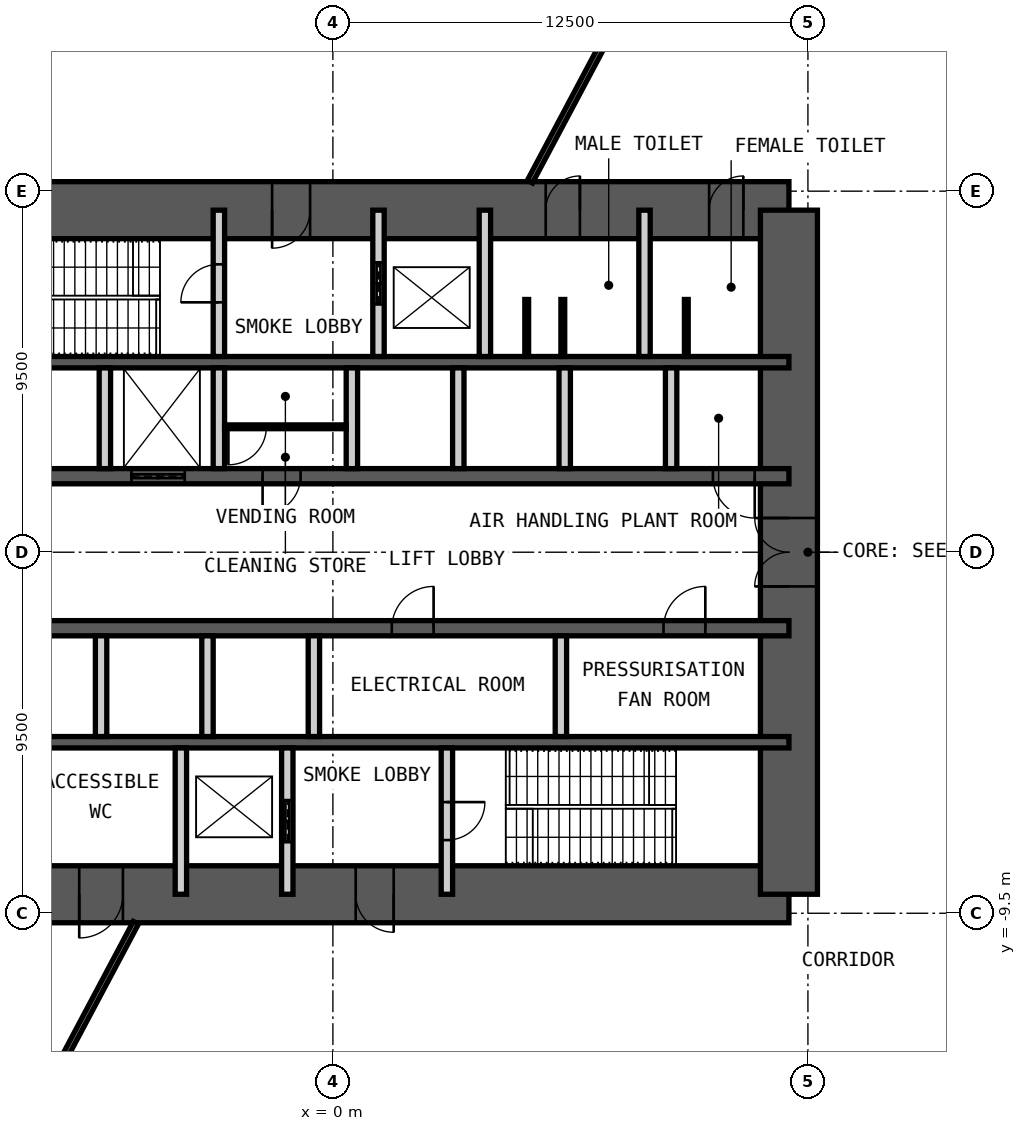
"""IFC4 building model, lengths in metres.
Left out: names, types, materials, properties, quantities, classifications, styles, units other than length and angle.
Written with IfcOpenShell. Run it as: python <this file> out.ifc"""

import sys

from ifc_helpers import new_model, si_unit, direction, frame, frame_2d, origin, place, context, subcontext, project, spatial, rectangle, extrude, element, fill, save


model = new_model("IFC4")
c1 = context("Model", 3, precision=1e-05, world=origin(), true_north=direction((0.0, 1.0)))
c2 = subcontext(c1, "Body", "Model", "MODEL_VIEW")
j1 = project(units=[si_unit("LENGTHUNIT", "METRE"), si_unit("PLANEANGLEUNIT", "RADIAN")], contexts=[c1])
p1 = place(None, origin())
s1 = spatial("IfcSite", under=j1, at=p1, CompositionType="ELEMENT")
p2 = place(p1, origin())
s2 = spatial("IfcBuilding", under=s1, at=p2, CompositionType="ELEMENT")
p3 = place(p2, frame((0.0, 0.0, -6.0)))
s3 = spatial("IfcBuildingStorey", under=s2, at=p3, CompositionType="ELEMENT", Elevation=-6.0)
p4 = place(p3, frame((-12.0, 9.0, 0.0), z_axis=(0.0, 0.0, 1.0), x_axis=(1.0, 0.0, 0.0)))
e1 = element("IfcWall", 1, at=p4, inside=s3, PredefinedType="SHEAR", context=c2, shape_type="SweptSolid", body=[
    extrude(rectangle(XDim=24.0, YDim=1.5, at=frame_2d((12.0, 0.0))), origin(), (0.0, 0.0, 1.0), 6.0),
])
p5 = place(p4, frame((10.4, 0.0, 0.0)))
e2 = element("IfcOpeningElement", 2, at=p5, cuts=e1, PredefinedType="OPENING", context=c2, shape_type="SweptSolid", body=[
    extrude(rectangle(XDim=1.0, YDim=2.1, at=frame_2d((0.5, 1.05))), frame((0.0, 0.76, 0.0), z_axis=(0.0, -1.0, 0.0), x_axis=(1.0, 0.0, 0.0)), (0.0, 0.0, 1.0), 1.52),
])
p6 = place(p4, frame((17.6, 0.0, 0.0)))
e3 = element("IfcOpeningElement", 3, at=p6, cuts=e1, PredefinedType="OPENING", context=c2, shape_type="SweptSolid", body=[
    extrude(rectangle(XDim=0.9, YDim=2.1, at=frame_2d((0.45, 1.05))), frame((0.0, 0.76, 0.0), z_axis=(0.0, -1.0, 0.0), x_axis=(1.0, 0.0, 0.0)), (0.0, 0.0, 1.0), 1.52),
])
p7 = place(p4, frame((21.9, 0.0, 0.0)))
e4 = element("IfcOpeningElement", 4, at=p7, cuts=e1, PredefinedType="OPENING", context=c2, shape_type="SweptSolid", body=[
    extrude(rectangle(XDim=0.9, YDim=2.1, at=frame_2d((0.45, 1.05))), frame((0.0, 0.76, 0.0), z_axis=(0.0, -1.0, 0.0), x_axis=(1.0, 0.0, 0.0)), (0.0, 0.0, 1.0), 1.52),
])
p8 = place(p3, frame((-12.0, -9.0, 0.0), z_axis=(0.0, 0.0, 1.0), x_axis=(1.0, 0.0, 0.0)))
e5 = element("IfcWall", 5, at=p8, inside=s3, PredefinedType="SHEAR", context=c2, shape_type="SweptSolid", body=[
    extrude(rectangle(XDim=24.0, YDim=1.5, at=frame_2d((12.0, 0.0))), origin(), (0.0, 0.0, 1.0), 6.0),
])
p9 = place(p8, frame((1.35, 0.0, 0.0)))
e6 = element("IfcOpeningElement", 6, at=p9, cuts=e5, PredefinedType="OPENING", context=c2, shape_type="SweptSolid", body=[
    extrude(rectangle(XDim=1.0, YDim=2.1, at=frame_2d((0.5, 1.05))), frame((0.0, 0.76, 0.0), z_axis=(0.0, -1.0, 0.0), x_axis=(1.0, 0.0, 0.0)), (0.0, 0.0, 1.0), 1.52),
])
p10 = place(p8, frame((5.325, 0.0, 0.0)))
e7 = element("IfcOpeningElement", 7, at=p10, cuts=e5, PredefinedType="OPENING", context=c2, shape_type="SweptSolid", body=[
    extrude(rectangle(XDim=1.15, YDim=2.1, at=frame_2d((0.575, 1.05))), frame((0.0, 0.76, 0.0), z_axis=(0.0, -1.0, 0.0), x_axis=(1.0, 0.0, 0.0)), (0.0, 0.0, 1.0), 1.52),
])
p11 = place(p8, frame((12.6, 0.0, 0.0)))
e8 = element("IfcOpeningElement", 8, at=p11, cuts=e5, PredefinedType="OPENING", context=c2, shape_type="SweptSolid", body=[
    extrude(rectangle(XDim=1.0, YDim=2.1, at=frame_2d((0.5, 1.05))), frame((0.0, 0.76, 0.0), z_axis=(0.0, -1.0, 0.0), x_axis=(1.0, 0.0, 0.0)), (0.0, 0.0, 1.0), 1.52),
])
p12 = place(p3, frame((12.0, -9.0, 0.0), z_axis=(0.0, 0.0, 1.0), x_axis=(0.0, 1.0, 0.0)))
e9 = element("IfcWall", 9, at=p12, inside=s3, PredefinedType="SHEAR", context=c2, shape_type="SweptSolid", body=[
    extrude(rectangle(XDim=18.0, YDim=1.5, at=frame_2d((9.0, 0.0))), origin(), (0.0, 0.0, 1.0), 6.0),
])
p13 = place(p12, frame((8.1, 0.0, 0.0)))
e10 = element("IfcOpeningElement", 10, at=p13, cuts=e9, PredefinedType="OPENING", context=c2, shape_type="SweptSolid", body=[
    extrude(rectangle(XDim=1.8, YDim=2.1, at=frame_2d((0.9, 1.05))), frame((0.0, 0.76, 0.0), z_axis=(0.0, -1.0, 0.0), x_axis=(1.0, 0.0, 0.0)), (0.0, 0.0, 1.0), 1.52),
])
p14 = place(p3, frame((-12.0, 5.0, 0.0), z_axis=(0.0, 0.0, 1.0), x_axis=(1.0, 0.0, 0.0)))
e11 = element("IfcWall", 11, at=p14, inside=s3, PredefinedType="SHEAR", context=c2, shape_type="SweptSolid", body=[
    extrude(rectangle(XDim=24.0, YDim=0.3, at=frame_2d((12.0, 0.0))), origin(), (0.0, 0.0, 1.0), 6.0),
])
p15 = place(p3, frame((-12.0, 2.0, 0.0), z_axis=(0.0, 0.0, 1.0), x_axis=(1.0, 0.0, 0.0)))
e12 = element("IfcWall", 12, at=p15, inside=s3, PredefinedType="SHEAR", context=c2, shape_type="SweptSolid", body=[
    extrude(rectangle(XDim=24.0, YDim=0.4, at=frame_2d((12.0, 0.0))), origin(), (0.0, 0.0, 1.0), 6.0),
])
p16 = place(p15, frame((2.4, 0.0, 0.0)))
e13 = element("IfcOpeningElement", 13, at=p16, cuts=e12, PredefinedType="OPENING", context=c2, shape_type="SweptSolid", body=[
    extrude(rectangle(XDim=1.1, YDim=2.1, at=frame_2d((0.55, 1.05))), frame((0.0, 0.21, 0.0), z_axis=(0.0, -1.0, 0.0), x_axis=(1.0, 0.0, 0.0)), (0.0, 0.0, 1.0), 0.42),
])
p17 = place(p15, frame((22.0, 0.0, 0.0)))
e14 = element("IfcOpeningElement", 14, at=p17, cuts=e12, PredefinedType="OPENING", context=c2, shape_type="SweptSolid", body=[
    extrude(rectangle(XDim=1.1, YDim=2.1, at=frame_2d((0.55, 1.05))), frame((0.0, 0.21, 0.0), z_axis=(0.0, -1.0, 0.0), x_axis=(1.0, 0.0, 0.0)), (0.0, 0.0, 1.0), 0.42),
])
p18 = place(p15, frame((10.15, 0.0, 0.0)))
e15 = element("IfcOpeningElement", 15, at=p18, cuts=e12, PredefinedType="OPENING", context=c2, shape_type="SweptSolid", body=[
    extrude(rectangle(XDim=1.0, YDim=2.1, at=frame_2d((0.5, 1.05))), frame((0.0, 0.21, 0.0), z_axis=(0.0, -1.0, 0.0), x_axis=(1.0, 0.0, 0.0)), (0.0, 0.0, 1.0), 0.42),
])
p19 = place(p15, frame((6.7, 0.0, 0.0)))
e16 = element("IfcOpeningElement", 16, at=p19, cuts=e12, PredefinedType="OPENING", context=c2, shape_type="SweptSolid", body=[
    extrude(rectangle(XDim=1.4, YDim=2.4, at=frame_2d((0.7, 1.2))), frame((0.0, 0.21, 0.0), z_axis=(0.0, -1.0, 0.0), x_axis=(1.0, 0.0, 0.0)), (0.0, 0.0, 1.0), 0.42),
])
p20 = place(p3, frame((-12.0, -2.0, 0.0), z_axis=(0.0, 0.0, 1.0), x_axis=(1.0, 0.0, 0.0)))
e17 = element("IfcWall", 17, at=p20, inside=s3, PredefinedType="SHEAR", context=c2, shape_type="SweptSolid", body=[
    extrude(rectangle(XDim=24.0, YDim=0.4, at=frame_2d((12.0, 0.0))), origin(), (0.0, 0.0, 1.0), 6.0),
])
p21 = place(p20, frame((1.1, 0.0, 0.0)))
e18 = element("IfcOpeningElement", 18, at=p21, cuts=e17, PredefinedType="OPENING", context=c2, shape_type="SweptSolid", body=[
    extrude(rectangle(XDim=1.1, YDim=2.1, at=frame_2d((0.55, 1.05))), frame((0.0, 0.21, 0.0), z_axis=(0.0, -1.0, 0.0), x_axis=(1.0, 0.0, 0.0)), (0.0, 0.0, 1.0), 0.42),
])
p22 = place(p20, frame((13.55, 0.0, 0.0)))
e19 = element("IfcOpeningElement", 19, at=p22, cuts=e17, PredefinedType="OPENING", context=c2, shape_type="SweptSolid", body=[
    extrude(rectangle(XDim=1.1, YDim=2.1, at=frame_2d((0.55, 1.05))), frame((0.0, 0.21, 0.0), z_axis=(0.0, -1.0, 0.0), x_axis=(1.0, 0.0, 0.0)), (0.0, 0.0, 1.0), 0.42),
])
p23 = place(p20, frame((20.7, 0.0, 0.0)))
e20 = element("IfcOpeningElement", 20, at=p23, cuts=e17, PredefinedType="OPENING", context=c2, shape_type="SweptSolid", body=[
    extrude(rectangle(XDim=1.1, YDim=2.1, at=frame_2d((0.55, 1.05))), frame((0.0, 0.21, 0.0), z_axis=(0.0, -1.0, 0.0), x_axis=(1.0, 0.0, 0.0)), (0.0, 0.0, 1.0), 0.42),
])
p24 = place(p3, frame((-12.0, -5.0, 0.0), z_axis=(0.0, 0.0, 1.0), x_axis=(1.0, 0.0, 0.0)))
e21 = element("IfcWall", 21, at=p24, inside=s3, PredefinedType="SHEAR", context=c2, shape_type="SweptSolid", body=[
    extrude(rectangle(XDim=24.0, YDim=0.3, at=frame_2d((12.0, 0.0))), origin(), (0.0, 0.0, 1.0), 6.0),
])
p25 = place(p3, frame((-3.0, 5.15, 0.0), z_axis=(0.0, 0.0, 1.0), x_axis=(0.0, 1.0, 0.0)))
e22 = element("IfcWall", 22, at=p25, inside=s3, PredefinedType="PARTITIONING", context=c2, shape_type="SweptSolid", body=[
    extrude(rectangle(XDim=3.85, YDim=0.3, at=frame_2d((1.925, 0.0))), origin(), (0.0, 0.0, 1.0), 5.78),
])
p26 = place(p25, frame((1.425, 0.0, 0.0)))
e23 = element("IfcOpeningElement", 23, at=p26, cuts=e22, PredefinedType="OPENING", context=c2, shape_type="SweptSolid", body=[
    extrude(rectangle(XDim=1.0, YDim=2.1, at=frame_2d((0.5, 1.05))), frame((0.0, 0.16, 0.0), z_axis=(0.0, -1.0, 0.0), x_axis=(1.0, 0.0, 0.0)), (0.0, 0.0, 1.0), 0.32),
])
p27 = place(p3, frame((1.2, 5.15, 0.0), z_axis=(0.0, 0.0, 1.0), x_axis=(0.0, 1.0, 0.0)))
e24 = element("IfcWall", 24, at=p27, inside=s3, PredefinedType="PARTITIONING", context=c2, shape_type="SweptSolid", body=[
    extrude(rectangle(XDim=3.85, YDim=0.3, at=frame_2d((1.925, 0.0))), origin(), (0.0, 0.0, 1.0), 5.78),
])
p28 = place(p27, frame((1.375, 0.0, 0.0)))
e25 = element("IfcOpeningElement", 25, at=p28, cuts=e24, PredefinedType="OPENING", context=c2, shape_type="SweptSolid", body=[
    extrude(rectangle(XDim=1.1, YDim=2.4, at=frame_2d((0.55, 1.2))), frame((0.0, 0.16, 0.0), z_axis=(0.0, -1.0, 0.0), x_axis=(1.0, 0.0, 0.0)), (0.0, 0.0, 1.0), 0.32),
])
for number, where, z_axis, x_axis in (
    (26, (4.0, 5.15, 0.0), (0.0, 0.0, 1.0), (0.0, 1.0, 0.0)),
    (27, (8.2, 5.15, 0.0), (0.0, 0.0, 1.0), (0.0, 1.0, 0.0)),
):
    element("IfcWall", number, at=place(p3, frame(where, z_axis=z_axis, x_axis=x_axis)), inside=s3, PredefinedType="PARTITIONING", context=c2, shape_type="SweptSolid", body=[
        extrude(rectangle(XDim=3.85, YDim=0.3, at=frame_2d((1.925, 0.0))), origin(), (0.0, 0.0, 1.0), 5.78),
    ])
for number, where, z_axis, x_axis in (
    (28, (-6.0, 2.2, 0.0), (0.0, 0.0, 1.0), (0.0, 1.0, 0.0)),
    (29, (-3.0, 2.2, 0.0), (0.0, 0.0, 1.0), (0.0, 1.0, 0.0)),
    (30, (0.5, 2.2, 0.0), (0.0, 0.0, 1.0), (0.0, 1.0, 0.0)),
    (31, (3.3, 2.2, 0.0), (0.0, 0.0, 1.0), (0.0, 1.0, 0.0)),
    (32, (6.1, 2.2, 0.0), (0.0, 0.0, 1.0), (0.0, 1.0, 0.0)),
    (33, (8.9, 2.2, 0.0), (0.0, 0.0, 1.0), (0.0, 1.0, 0.0)),
    (34, (-6.1, -4.85, 0.0), (0.0, 0.0, 1.0), (0.0, 1.0, 0.0)),
    (35, (-3.3, -4.85, 0.0), (0.0, 0.0, 1.0), (0.0, 1.0, 0.0)),
    (36, (-0.5, -4.85, 0.0), (0.0, 0.0, 1.0), (0.0, 1.0, 0.0)),
    (37, (6.0, -4.85, 0.0), (0.0, 0.0, 1.0), (0.0, 1.0, 0.0)),
):
    element("IfcWall", number, at=place(p3, frame(where, z_axis=z_axis, x_axis=x_axis)), inside=s3, PredefinedType="PARTITIONING", context=c2, shape_type="SweptSolid", body=[
        extrude(rectangle(XDim=2.65, YDim=0.3, at=frame_2d((1.325, 0.0))), origin(), (0.0, 0.0, 1.0), 5.78),
    ])
p29 = place(p3, frame((-4.0, -9.0, 0.0), z_axis=(0.0, 0.0, 1.0), x_axis=(0.0, 1.0, 0.0)))
e38 = element("IfcWall", 38, at=p29, inside=s3, PredefinedType="PARTITIONING", context=c2, shape_type="SweptSolid", body=[
    extrude(rectangle(XDim=3.85, YDim=0.3, at=frame_2d((1.925, 0.0))), origin(), (0.0, 0.0, 1.0), 5.78),
])
p30 = place(p3, frame((-1.2, -9.0, 0.0), z_axis=(0.0, 0.0, 1.0), x_axis=(0.0, 1.0, 0.0)))
e39 = element("IfcWall", 39, at=p30, inside=s3, PredefinedType="PARTITIONING", context=c2, shape_type="SweptSolid", body=[
    extrude(rectangle(XDim=3.85, YDim=0.3, at=frame_2d((1.925, 0.0))), origin(), (0.0, 0.0, 1.0), 5.78),
])
p31 = place(p30, frame((1.375, 0.0, 0.0)))
e40 = element("IfcOpeningElement", 40, at=p31, cuts=e39, PredefinedType="OPENING", context=c2, shape_type="SweptSolid", body=[
    extrude(rectangle(XDim=1.1, YDim=2.4, at=frame_2d((0.55, 1.2))), frame((0.0, 0.16, 0.0), z_axis=(0.0, -1.0, 0.0), x_axis=(1.0, 0.0, 0.0)), (0.0, 0.0, 1.0), 0.32),
])
p32 = place(p3, frame((3.0, -9.0, 0.0), z_axis=(0.0, 0.0, 1.0), x_axis=(0.0, 1.0, 0.0)))
e41 = element("IfcWall", 41, at=p32, inside=s3, PredefinedType="PARTITIONING", context=c2, shape_type="SweptSolid", body=[
    extrude(rectangle(XDim=3.85, YDim=0.3, at=frame_2d((1.925, 0.0))), origin(), (0.0, 0.0, 1.0), 5.78),
])
p33 = place(p32, frame((1.425, 0.0, 0.0)))
e42 = element("IfcOpeningElement", 42, at=p33, cuts=e41, PredefinedType="OPENING", context=c2, shape_type="SweptSolid", body=[
    extrude(rectangle(XDim=1.0, YDim=2.1, at=frame_2d((0.5, 1.05))), frame((0.0, 0.16, 0.0), z_axis=(0.0, -1.0, 0.0), x_axis=(1.0, 0.0, 0.0)), (0.0, 0.0, 1.0), 0.32),
])
p34 = place(p3, frame((-2.85, 3.3, 0.0), z_axis=(0.0, 0.0, 1.0), x_axis=(1.0, 0.0, 0.0)))
e43 = element("IfcWall", 43, at=p34, inside=s3, PredefinedType="PARTITIONING", context=c2, shape_type="SweptSolid", body=[
    extrude(rectangle(XDim=3.2, YDim=0.1, at=frame_2d((1.6, 0.0))), origin(), (0.0, 0.0, 1.0), 5.78),
])
p35 = place(p34, frame((0.1, 0.0, 0.0)))
e44 = element("IfcOpeningElement", 44, at=p35, cuts=e43, PredefinedType="OPENING", context=c2, shape_type="SweptSolid", body=[
    extrude(rectangle(XDim=1.0, YDim=2.4, at=frame_2d((0.5, 1.2))), frame((0.0, 0.06, 0.0), z_axis=(0.0, -1.0, 0.0), x_axis=(1.0, 0.0, 0.0)), (0.0, 0.0, 1.0), 0.12),
])
for number, where, z_axis, x_axis in (
    (45, (5.1, 5.15, 0.0), (0.0, 0.0, 1.0), (0.0, 1.0, 0.0)),
    (46, (6.05, 5.15, 0.0), (0.0, 0.0, 1.0), (0.0, 1.0, 0.0)),
    (47, (9.3, 5.15, 0.0), (0.0, 0.0, 1.0), (0.0, 1.0, 0.0)),
):
    element("IfcWall", number, at=place(p3, frame(where, z_axis=z_axis, x_axis=x_axis)), inside=s3, PredefinedType="PARTITIONING", context=c2, shape_type="SweptSolid", body=[
        extrude(rectangle(XDim=1.5, YDim=0.1, at=frame_2d((0.75, 0.0))), origin(), (0.0, 0.0, 1.0), 2.1),
    ])
p36 = place(p3, frame((5.184, 9.75, 0.0), z_axis=(0.0, 0.0, 1.0), x_axis=(0.469471208528, 0.882947781221, 0.0)))
e48 = element("IfcWall", 48, at=p36, inside=s3, PredefinedType="PARTITIONING", context=c2, shape_type="SweptSolid", body=[
    extrude(rectangle(XDim=26.134, YDim=0.15, at=frame_2d((13.067, 0.0))), origin(), (0.0, 0.0, 1.0), 5.75),
])
p37 = place(p36, frame((12.167, 0.0, 0.0)))
e49 = element("IfcOpeningElement", 49, at=p37, cuts=e48, PredefinedType="OPENING", context=c2, shape_type="SweptSolid", body=[
    extrude(rectangle(XDim=1.8, YDim=2.4, at=frame_2d((0.9, 1.2))), frame((0.0, 0.085, 0.0), z_axis=(0.0, -1.0, 0.0), x_axis=(1.0, 0.0, 0.0)), (0.0, 0.0, 1.0), 0.17),
])
p38 = place(p3, frame((-5.184, -9.75, 0.0), z_axis=(0.0, 0.0, 1.0), x_axis=(-0.469470342993, -0.882948241433, 0.0)))
e50 = element("IfcWall", 50, at=p38, inside=s3, PredefinedType="PARTITIONING", context=c2, shape_type="SweptSolid", body=[
    extrude(rectangle(XDim=27.565, YDim=0.15, at=frame_2d((13.783, 0.0))), origin(), (0.0, 0.0, 1.0), 5.75),
])
p39 = place(p38, frame((12.883, 0.0, 0.0)))
e51 = element("IfcOpeningElement", 51, at=p39, cuts=e50, PredefinedType="OPENING", context=c2, shape_type="SweptSolid", body=[
    extrude(rectangle(XDim=1.8, YDim=2.4, at=frame_2d((0.9, 1.2))), frame((0.0, 0.085, 0.0), z_axis=(0.0, -1.0, 0.0), x_axis=(1.0, 0.0, 0.0)), (0.0, 0.0, 1.0), 0.17),
])
p40 = place(p5, origin())
e52 = element("IfcDoor", 52, at=p40, inside=s3, OperationType="SINGLE_SWING_LEFT", PredefinedType="DOOR", context=c2, shape_type="SweptSolid", body=[
    extrude(rectangle(XDim=1.0, YDim=2.1, at=frame_2d((0.5, 1.05))), frame((0.0, 0.025, 0.0), z_axis=(0.0, -1.0, 0.0), x_axis=(1.0, 0.0, 0.0)), (0.0, 0.0, 1.0), 0.05),
])
fill(e2, e52)
p41 = place(p6, origin())
e53 = element("IfcDoor", 53, at=p41, inside=s3, OperationType="SINGLE_SWING_LEFT", PredefinedType="DOOR", context=c2, shape_type="SweptSolid", body=[
    extrude(rectangle(XDim=0.9, YDim=2.1, at=frame_2d((0.45, 1.05))), frame((0.0, 0.025, 0.0), z_axis=(0.0, -1.0, 0.0), x_axis=(1.0, 0.0, 0.0)), (0.0, 0.0, 1.0), 0.05),
])
fill(e3, e53)
p42 = place(p7, origin())
e54 = element("IfcDoor", 54, at=p42, inside=s3, OperationType="SINGLE_SWING_LEFT", PredefinedType="DOOR", context=c2, shape_type="SweptSolid", body=[
    extrude(rectangle(XDim=0.9, YDim=2.1, at=frame_2d((0.45, 1.05))), frame((0.0, 0.025, 0.0), z_axis=(0.0, -1.0, 0.0), x_axis=(1.0, 0.0, 0.0)), (0.0, 0.0, 1.0), 0.05),
])
fill(e4, e54)
p43 = place(p10, origin())
e55 = element("IfcDoor", 55, at=p43, inside=s3, OperationType="SINGLE_SWING_LEFT", PredefinedType="DOOR", context=c2, shape_type="SweptSolid", body=[
    extrude(rectangle(XDim=1.15, YDim=2.1, at=frame_2d((0.575, 1.05))), frame((0.0, 0.025, 0.0), z_axis=(0.0, -1.0, 0.0), x_axis=(1.0, 0.0, 0.0)), (0.0, 0.0, 1.0), 0.05),
])
fill(e7, e55)
p44 = place(p11, origin())
e56 = element("IfcDoor", 56, at=p44, inside=s3, OperationType="SINGLE_SWING_RIGHT", PredefinedType="DOOR", context=c2, shape_type="SweptSolid", body=[
    extrude(rectangle(XDim=1.0, YDim=2.1, at=frame_2d((0.5, 1.05))), frame((0.0, 0.025, 0.0), z_axis=(0.0, -1.0, 0.0), x_axis=(1.0, 0.0, 0.0)), (0.0, 0.0, 1.0), 0.05),
])
fill(e8, e56)
p45 = place(p26, origin())
e57 = element("IfcDoor", 57, at=p45, inside=s3, OperationType="SINGLE_SWING_RIGHT", PredefinedType="DOOR", context=c2, shape_type="SweptSolid", body=[
    extrude(rectangle(XDim=1.0, YDim=2.1, at=frame_2d((0.5, 1.05))), frame((0.0, 0.025, 0.0), z_axis=(0.0, -1.0, 0.0), x_axis=(1.0, 0.0, 0.0)), (0.0, 0.0, 1.0), 0.05),
])
fill(e23, e57)
p46 = place(p33, origin())
e58 = element("IfcDoor", 58, at=p46, inside=s3, OperationType="SINGLE_SWING_RIGHT", PredefinedType="DOOR", context=c2, shape_type="SweptSolid", body=[
    extrude(rectangle(XDim=1.0, YDim=2.1, at=frame_2d((0.5, 1.05))), frame((0.0, 0.025, 0.0), z_axis=(0.0, -1.0, 0.0), x_axis=(1.0, 0.0, 0.0)), (0.0, 0.0, 1.0), 0.05),
])
fill(e42, e58)
p47 = place(p17, origin())
e59 = element("IfcDoor", 59, at=p47, inside=s3, OperationType="SINGLE_SWING_RIGHT", PredefinedType="DOOR", context=c2, shape_type="SweptSolid", body=[
    extrude(rectangle(XDim=1.1, YDim=2.1, at=frame_2d((0.55, 1.05))), frame((0.0, 0.025, 0.0), z_axis=(0.0, -1.0, 0.0), x_axis=(1.0, 0.0, 0.0)), (0.0, 0.0, 1.0), 0.05),
])
fill(e14, e59)
p48 = place(p18, origin())
e60 = element("IfcDoor", 60, at=p48, inside=s3, OperationType="SINGLE_SWING_LEFT", PredefinedType="DOOR", context=c2, shape_type="SweptSolid", body=[
    extrude(rectangle(XDim=1.0, YDim=2.1, at=frame_2d((0.5, 1.05))), frame((0.0, 0.025, 0.0), z_axis=(0.0, -1.0, 0.0), x_axis=(1.0, 0.0, 0.0)), (0.0, 0.0, 1.0), 0.05),
])
fill(e15, e60)
p49 = place(p22, origin())
e61 = element("IfcDoor", 61, at=p49, inside=s3, OperationType="SINGLE_SWING_LEFT", PredefinedType="DOOR", context=c2, shape_type="SweptSolid", body=[
    extrude(rectangle(XDim=1.1, YDim=2.1, at=frame_2d((0.55, 1.05))), frame((0.0, 0.025, 0.0), z_axis=(0.0, -1.0, 0.0), x_axis=(1.0, 0.0, 0.0)), (0.0, 0.0, 1.0), 0.05),
])
fill(e19, e61)
p50 = place(p23, origin())
e62 = element("IfcDoor", 62, at=p50, inside=s3, OperationType="SINGLE_SWING_LEFT", PredefinedType="DOOR", context=c2, shape_type="SweptSolid", body=[
    extrude(rectangle(XDim=1.1, YDim=2.1, at=frame_2d((0.55, 1.05))), frame((0.0, 0.025, 0.0), z_axis=(0.0, -1.0, 0.0), x_axis=(1.0, 0.0, 0.0)), (0.0, 0.0, 1.0), 0.05),
])
fill(e20, e62)
p51 = place(p13, origin())
e63 = element("IfcDoor", 63, at=p51, inside=s3, OperationType="DOUBLE_DOOR_DOUBLE_SWING", PredefinedType="DOOR", context=c2, shape_type="SweptSolid", body=[
    extrude(rectangle(XDim=1.8, YDim=2.1, at=frame_2d((0.9, 1.05))), frame((0.0, 0.025, 0.0), z_axis=(0.0, -1.0, 0.0), x_axis=(1.0, 0.0, 0.0)), (0.0, 0.0, 1.0), 0.05),
])
fill(e10, e63)
p52 = place(p28, origin())
e64 = element("IfcDoor", 64, at=p52, inside=s3, OperationType="DOUBLE_DOOR_SLIDING", PredefinedType="DOOR", context=c2, shape_type="SweptSolid", body=[
    extrude(rectangle(XDim=1.1, YDim=2.4, at=frame_2d((0.55, 1.2))), frame((0.0, 0.025, 0.0), z_axis=(0.0, -1.0, 0.0), x_axis=(1.0, 0.0, 0.0)), (0.0, 0.0, 1.0), 0.05),
])
fill(e25, e64)
p53 = place(p31, origin())
e65 = element("IfcDoor", 65, at=p53, inside=s3, OperationType="DOUBLE_DOOR_SLIDING", PredefinedType="DOOR", context=c2, shape_type="SweptSolid", body=[
    extrude(rectangle(XDim=1.1, YDim=2.4, at=frame_2d((0.55, 1.2))), frame((0.0, 0.025, 0.0), z_axis=(0.0, -1.0, 0.0), x_axis=(1.0, 0.0, 0.0)), (0.0, 0.0, 1.0), 0.05),
])
fill(e40, e65)
p54 = place(p19, origin())
e66 = element("IfcDoor", 66, at=p54, inside=s3, OperationType="DOUBLE_DOOR_SLIDING", PredefinedType="DOOR", context=c2, shape_type="SweptSolid", body=[
    extrude(rectangle(XDim=1.4, YDim=2.4, at=frame_2d((0.7, 1.2))), frame((0.0, 0.025, 0.0), z_axis=(0.0, -1.0, 0.0), x_axis=(1.0, 0.0, 0.0)), (0.0, 0.0, 1.0), 0.05),
])
fill(e16, e66)
p55 = place(p35, origin())
e67 = element("IfcDoor", 67, at=p55, inside=s3, OperationType="SINGLE_SWING_LEFT", PredefinedType="DOOR", context=c2, shape_type="SweptSolid", body=[
    extrude(rectangle(XDim=1.0, YDim=2.4, at=frame_2d((0.5, 1.2))), frame((0.0, 0.025, 0.0), z_axis=(0.0, -1.0, 0.0), x_axis=(1.0, 0.0, 0.0)), (0.0, 0.0, 1.0), 0.05),
])
fill(e44, e67)
save(model, sys.argv[1])
